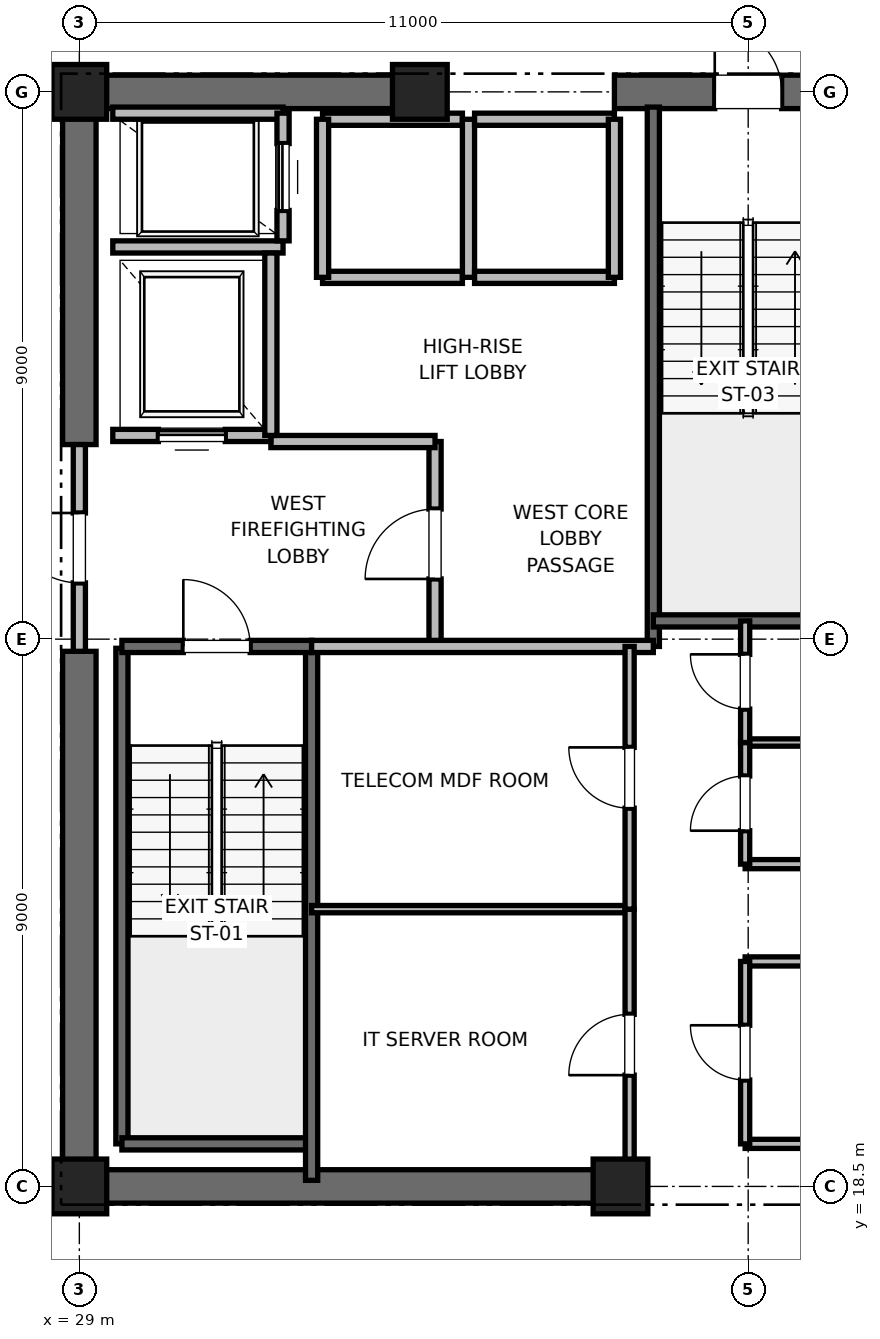
"""IFC4 building model, lengths in metres.
Left out: names, types, materials, properties, quantities, classifications, styles, units other than length and angle.
Written with IfcOpenShell. Run it as: python <this file> out.ifc"""

import sys

from ifc_helpers import new_model, si_unit, direction, frame, frame_2d, origin, origin_2d, place, context, subcontext, project, spatial, rectangle, extrude, element, fill, save


model = new_model("IFC4")
c1 = context("Model", 3, precision=1e-05, world=origin(), true_north=direction((0.0, 1.0)))
c2 = subcontext(c1, "Body", "Model", "MODEL_VIEW")
j1 = project(units=[si_unit("LENGTHUNIT", "METRE"), si_unit("PLANEANGLEUNIT", "RADIAN")], contexts=[c1])
p1 = place(None, origin())
s1 = spatial("IfcSite", under=j1, at=p1, CompositionType="ELEMENT")
p2 = place(p1, origin())
s2 = spatial("IfcBuilding", under=s1, at=p2, CompositionType="ELEMENT")
p3 = place(p2, frame((0.0, 0.0, 229.2)))
s3 = spatial("IfcBuildingStorey", under=s2, at=p3, CompositionType="ELEMENT", Elevation=229.2)
for number, where, z_axis, x_axis in (
    (1, (29.0, 18.5, 0.0), (0.0, 0.0, 1.0), (1.0, 0.0, 0.0)),
    (2, (29.0, 36.5, 0.0), (0.0, 0.0, 1.0), (1.0, 0.0, 0.0)),
    (3, (37.9, 18.5, 0.0), (0.0, 0.0, 1.0), (1.0, 0.0, 0.0)),
    (4, (34.6, 36.5, 0.0), (0.0, 0.0, 1.0), (1.0, 0.0, 0.0)),
):
    element("IfcColumn", number, at=place(p3, frame(where, z_axis=z_axis, x_axis=x_axis)), inside=s3, PredefinedType="PILASTER", context=c2, shape_type="SweptSolid", body=[
        extrude(rectangle(XDim=0.9, YDim=0.9, at=origin_2d()), origin(), (0.0, 0.0, 1.0), 4.0),
    ])
p4 = place(p3, frame((29.0, 18.5, 0.0), z_axis=(0.0, 0.0, 1.0), x_axis=(1.0, 0.0, 0.0)))
e5 = element("IfcWall", 5, at=p4, inside=s3, PredefinedType="SHEAR", context=c2, shape_type="SweptSolid", body=[
    extrude(rectangle(XDim=9.2, YDim=0.55, at=frame_2d((4.6, 0.0))), origin(), (0.0, 0.0, 1.0), 3.7),
])
p5 = place(p3, frame((29.0, 36.5, 0.0), z_axis=(0.0, 0.0, 1.0), x_axis=(1.0, 0.0, 0.0)))
e6 = element("IfcWall", 6, at=p5, inside=s3, PredefinedType="SHEAR", context=c2, shape_type="SweptSolid", body=[
    extrude(rectangle(XDim=5.8, YDim=0.55, at=frame_2d((2.9, 0.0))), origin(), (0.0, 0.0, 1.0), 3.7),
])
p6 = place(p3, frame((37.8, 36.5, 0.0), z_axis=(0.0, 0.0, 1.0), x_axis=(1.0, 0.0, 0.0)))
e7 = element("IfcWall", 7, at=p6, inside=s3, PredefinedType="SHEAR", context=c2, shape_type="SweptSolid", body=[
    extrude(rectangle(XDim=4.4, YDim=0.55, at=frame_2d((2.2, 0.0))), origin(), (0.0, 0.0, 1.0), 3.7),
])
p7 = place(p6, frame((1.65, 0.0, 0.0)))
e8 = element("IfcOpeningElement", 8, at=p7, cuts=e7, PredefinedType="OPENING", context=c2, shape_type="SweptSolid", body=[
    extrude(rectangle(XDim=1.1, YDim=2.15, at=frame_2d((0.55, 1.075))), frame((0.0, 0.275, 0.0), z_axis=(0.0, -1.0, 0.0), x_axis=(1.0, 0.0, 0.0)), (0.0, 0.0, 1.0), 0.55),
])
p8 = place(p3, frame((29.0, 18.5, 0.0), z_axis=(0.0, 0.0, 1.0), x_axis=(0.0, 1.0, 0.0)))
e9 = element("IfcWall", 9, at=p8, inside=s3, PredefinedType="SHEAR", context=c2, shape_type="SweptSolid", body=[
    extrude(rectangle(XDim=8.8, YDim=0.55, at=frame_2d((4.4, 0.0))), origin(), (0.0, 0.0, 1.0), 3.7),
])
p9 = place(p3, frame((29.0, 30.7, 0.0), z_axis=(0.0, 0.0, 1.0), x_axis=(0.0, 1.0, 0.0)))
e10 = element("IfcWall", 10, at=p9, inside=s3, PredefinedType="SHEAR", context=c2, shape_type="SweptSolid", body=[
    extrude(rectangle(XDim=5.8, YDim=0.55, at=frame_2d((2.9, 0.0))), origin(), (0.0, 0.0, 1.0), 3.7),
])
p10 = place(p3, frame((29.7, 19.2, 0.0), z_axis=(0.0, 0.0, 1.0), x_axis=(0.0, 1.0, 0.0)))
e11 = element("IfcWall", 11, at=p10, inside=s3, PredefinedType="SOLIDWALL", context=c2, shape_type="SweptSolid", body=[
    extrude(rectangle(XDim=8.15, YDim=0.2, at=frame_2d((4.075, 0.0))), origin(), (0.0, 0.0, 1.0), 3.7),
])
p11 = place(p3, frame((29.7, 19.2, 0.0), z_axis=(0.0, 0.0, 1.0), x_axis=(1.0, 0.0, 0.0)))
e12 = element("IfcWall", 12, at=p11, inside=s3, PredefinedType="SOLIDWALL", context=c2, shape_type="SweptSolid", body=[
    extrude(rectangle(XDim=3.12, YDim=0.2, at=frame_2d((1.56, 0.0))), origin(), (0.0, 0.0, 1.0), 3.7),
])
p12 = place(p3, frame((32.82, 18.6, 0.0), z_axis=(0.0, 0.0, 1.0), x_axis=(0.0, 1.0, 0.0)))
e13 = element("IfcWall", 13, at=p12, inside=s3, PredefinedType="SOLIDWALL", context=c2, shape_type="SweptSolid", body=[
    extrude(rectangle(XDim=8.78, YDim=0.2, at=frame_2d((4.39, 0.0))), origin(), (0.0, 0.0, 1.0), 3.7),
])
p13 = place(p3, frame((29.7, 27.38, 0.0), z_axis=(0.0, 0.0, 1.0), x_axis=(1.0, 0.0, 0.0)))
e14 = element("IfcWall", 14, at=p13, inside=s3, PredefinedType="SOLIDWALL", context=c2, shape_type="SweptSolid", body=[
    extrude(rectangle(XDim=3.12, YDim=0.2, at=frame_2d((1.56, 0.0))), origin(), (0.0, 0.0, 1.0), 3.7),
])
p14 = place(p13, frame((1.01, 0.0, 0.0)))
e15 = element("IfcOpeningElement", 15, at=p14, cuts=e14, PredefinedType="OPENING", context=c2, shape_type="SweptSolid", body=[
    extrude(rectangle(XDim=1.1, YDim=2.15, at=frame_2d((0.55, 1.075))), frame((0.0, 0.1, 0.0), z_axis=(0.0, -1.0, 0.0), x_axis=(1.0, 0.0, 0.0)), (0.0, 0.0, 1.0), 0.2),
])
p15 = place(p3, frame((38.44, 27.38, 0.0), z_axis=(0.0, 0.0, 1.0), x_axis=(0.0, 1.0, 0.0)))
e16 = element("IfcWall", 16, at=p15, inside=s3, PredefinedType="SOLIDWALL", context=c2, shape_type="SweptSolid", body=[
    extrude(rectangle(XDim=8.87, YDim=0.2, at=frame_2d((4.435, 0.0))), origin(), (0.0, 0.0, 1.0), 3.7),
])
p16 = place(p3, frame((38.44, 27.8, 0.0), z_axis=(0.0, 0.0, 1.0), x_axis=(1.0, 0.0, 0.0)))
e17 = element("IfcWall", 17, at=p16, inside=s3, PredefinedType="SOLIDWALL", context=c2, shape_type="SweptSolid", body=[
    extrude(rectangle(XDim=3.32, YDim=0.2, at=frame_2d((1.66, 0.0))), origin(), (0.0, 0.0, 1.0), 3.7),
])
p17 = place(p3, frame((34.85, 27.38, 0.0), z_axis=(0.0, 0.0, 1.0), x_axis=(0.0, 1.0, 0.0)))
e18 = element("IfcWall", 18, at=p17, inside=s3, PredefinedType="PARTITIONING", context=c2, shape_type="SweptSolid", body=[
    extrude(rectangle(XDim=3.37, YDim=0.2, at=frame_2d((1.685, 0.0))), origin(), (0.0, 0.0, 1.0), 3.7),
])
p18 = place(p17, frame((1.11, 0.0, 0.0)))
e19 = element("IfcOpeningElement", 19, at=p18, cuts=e18, PredefinedType="OPENING", context=c2, shape_type="SweptSolid", body=[
    extrude(rectangle(XDim=1.15, YDim=2.2, at=frame_2d((0.575, 1.1))), frame((0.0, 0.1, 0.0), z_axis=(0.0, -1.0, 0.0), x_axis=(1.0, 0.0, 0.0)), (0.0, 0.0, 1.0), 0.2),
])
p19 = place(p3, frame((29.0, 27.3, 0.0), z_axis=(0.0, 0.0, 1.0), x_axis=(0.0, 1.0, 0.0)))
e20 = element("IfcWall", 20, at=p19, inside=s3, PredefinedType="PARTITIONING", context=c2, shape_type="SweptSolid", body=[
    extrude(rectangle(XDim=3.4, YDim=0.2, at=frame_2d((1.7, 0.0))), origin(), (0.0, 0.0, 1.0), 2.68),
])
p20 = place(p19, frame((1.125, 0.0, 0.0)))
e21 = element("IfcOpeningElement", 21, at=p20, cuts=e20, PredefinedType="OPENING", context=c2, shape_type="SweptSolid", body=[
    extrude(rectangle(XDim=1.15, YDim=2.2, at=frame_2d((0.575, 1.1))), frame((0.0, 0.1, 0.0), z_axis=(0.0, -1.0, 0.0), x_axis=(1.0, 0.0, 0.0)), (0.0, 0.0, 1.0), 0.2),
])
p21 = place(p3, frame((32.82, 27.38, 0.0), z_axis=(0.0, 0.0, 1.0), x_axis=(1.0, 0.0, 0.0)))
e22 = element("IfcWall", 22, at=p21, inside=s3, PredefinedType="PARTITIONING", context=c2, shape_type="SweptSolid", body=[
    extrude(rectangle(XDim=5.62, YDim=0.2, at=frame_2d((2.81, 0.0))), origin(), (0.0, 0.0, 1.0), 3.7),
])
p22 = place(p3, frame((32.15, 30.75, 0.0), z_axis=(0.0, 0.0, 1.0), x_axis=(1.0, 0.0, 0.0)))
e23 = element("IfcWall", 23, at=p22, inside=s3, PredefinedType="PARTITIONING", context=c2, shape_type="SweptSolid", body=[
    extrude(rectangle(XDim=2.7, YDim=0.2, at=frame_2d((1.35, 0.0))), origin(), (0.0, 0.0, 1.0), 3.7),
])
p23 = place(p3, frame((29.55, 30.85, 0.0), z_axis=(0.0, 0.0, 1.0), x_axis=(1.0, 0.0, 0.0)))
e24 = element("IfcWall", 24, at=p23, inside=s3, PredefinedType="SOLIDWALL", context=c2, shape_type="SweptSolid", body=[
    extrude(rectangle(XDim=2.6, YDim=0.2, at=frame_2d((1.3, 0.0))), origin(), (0.0, 0.0, 1.0), 2.68),
])
p24 = place(p23, frame((0.75, 0.0, 0.0)))
e25 = element("IfcOpeningElement", 25, at=p24, cuts=e24, PredefinedType="OPENING", context=c2, shape_type="SweptSolid", body=[
    extrude(rectangle(XDim=1.1, YDim=2.2, at=frame_2d((0.55, 1.1))), frame((0.0, 0.1, 0.0), z_axis=(0.0, -1.0, 0.0), x_axis=(1.0, 0.0, 0.0)), (0.0, 0.0, 1.0), 0.2),
])
p25 = place(p3, frame((29.55, 33.95, 0.0), z_axis=(0.0, 0.0, 1.0), x_axis=(1.0, 0.0, 0.0)))
e26 = element("IfcWall", 26, at=p25, inside=s3, PredefinedType="SOLIDWALL", context=c2, shape_type="SweptSolid", body=[
    extrude(rectangle(XDim=2.8, YDim=0.2, at=frame_2d((1.4, 0.0))), origin(), (0.0, 0.0, 1.0), 3.7),
])
p26 = place(p3, frame((32.15, 30.85, 0.0), z_axis=(0.0, 0.0, 1.0), x_axis=(0.0, 1.0, 0.0)))
e27 = element("IfcWall", 27, at=p26, inside=s3, PredefinedType="SOLIDWALL", context=c2, shape_type="SweptSolid", body=[
    extrude(rectangle(XDim=3.0, YDim=0.2, at=frame_2d((1.5, 0.0))), origin(), (0.0, 0.0, 1.0), 3.7),
])
p27 = place(p3, frame((32.35, 36.15, 0.0), z_axis=(0.0, 0.0, 1.0), x_axis=(-1.0, 0.0, 0.0)))
e28 = element("IfcWall", 28, at=p27, inside=s3, PredefinedType="SOLIDWALL", context=c2, shape_type="SweptSolid", body=[
    extrude(rectangle(XDim=2.8, YDim=0.2, at=frame_2d((1.4, 0.0))), origin(), (0.0, 0.0, 1.0), 2.987),
])
p28 = place(p3, frame((32.35, 34.05, 0.0), z_axis=(0.0, 0.0, 1.0), x_axis=(0.0, 1.0, 0.0)))
e29 = element("IfcWall", 29, at=p28, inside=s3, PredefinedType="SOLIDWALL", context=c2, shape_type="SweptSolid", body=[
    extrude(rectangle(XDim=2.1, YDim=0.2, at=frame_2d((1.05, 0.0))), origin(), (0.0, 0.0, 1.0), 3.7),
])
p29 = place(p28, frame((0.5, 0.0, 0.0)))
e30 = element("IfcOpeningElement", 30, at=p29, cuts=e29, PredefinedType="OPENING", context=c2, shape_type="SweptSolid", body=[
    extrude(rectangle(XDim=1.1, YDim=2.2, at=frame_2d((0.55, 1.1))), frame((0.0, 0.1, 0.0), z_axis=(0.0, -1.0, 0.0), x_axis=(1.0, 0.0, 0.0)), (0.0, 0.0, 1.0), 0.2),
])
p30 = place(p3, frame((33.0, 33.45, 0.0), z_axis=(0.0, 0.0, 1.0), x_axis=(1.0, 0.0, 0.0)))
e31 = element("IfcWall", 31, at=p30, inside=s3, PredefinedType="SOLIDWALL", context=c2, shape_type="SweptSolid", body=[
    extrude(rectangle(XDim=2.3, YDim=0.2, at=frame_2d((1.15, 0.0))), origin(), (0.0, 0.0, 1.0), 3.7),
])
p31 = place(p3, frame((35.3, 36.05, 0.0), z_axis=(0.0, 0.0, 1.0), x_axis=(-1.0, 0.0, 0.0)))
e32 = element("IfcWall", 32, at=p31, inside=s3, PredefinedType="SOLIDWALL", context=c2, shape_type="SweptSolid", body=[
    extrude(rectangle(XDim=2.3, YDim=0.2, at=frame_2d((1.15, 0.0))), origin(), (0.0, 0.0, 1.0), 2.68),
])
p32 = place(p3, frame((33.0, 36.05, 0.0), z_axis=(0.0, 0.0, 1.0), x_axis=(0.0, -1.0, 0.0)))
e33 = element("IfcWall", 33, at=p32, inside=s3, PredefinedType="SOLIDWALL", context=c2, shape_type="SweptSolid", body=[
    extrude(rectangle(XDim=2.6, YDim=0.2, at=frame_2d((1.3, 0.0))), origin(), (0.0, 0.0, 1.0), 3.7),
])
p33 = place(p3, frame((35.4, 33.45, 0.0), z_axis=(0.0, 0.0, 1.0), x_axis=(0.0, 1.0, 0.0)))
e34 = element("IfcWall", 34, at=p33, inside=s3, PredefinedType="SOLIDWALL", context=c2, shape_type="SweptSolid", body=[
    extrude(rectangle(XDim=2.6, YDim=0.2, at=frame_2d((1.3, 0.0))), origin(), (0.0, 0.0, 1.0), 2.68),
])
p34 = place(p3, frame((35.5, 33.45, 0.0), z_axis=(0.0, 0.0, 1.0), x_axis=(1.0, 0.0, 0.0)))
e35 = element("IfcWall", 35, at=p34, inside=s3, PredefinedType="SOLIDWALL", context=c2, shape_type="SweptSolid", body=[
    extrude(rectangle(XDim=2.3, YDim=0.2, at=frame_2d((1.15, 0.0))), origin(), (0.0, 0.0, 1.0), 3.7),
])
p35 = place(p3, frame((37.8, 36.05, 0.0), z_axis=(0.0, 0.0, 1.0), x_axis=(-1.0, 0.0, 0.0)))
e36 = element("IfcWall", 36, at=p35, inside=s3, PredefinedType="SOLIDWALL", context=c2, shape_type="SweptSolid", body=[
    extrude(rectangle(XDim=2.3, YDim=0.2, at=frame_2d((1.15, 0.0))), origin(), (0.0, 0.0, 1.0), 2.68),
])
p36 = place(p3, frame((37.8, 33.45, 0.0), z_axis=(0.0, 0.0, 1.0), x_axis=(0.0, 1.0, 0.0)))
e37 = element("IfcWall", 37, at=p36, inside=s3, PredefinedType="SOLIDWALL", context=c2, shape_type="SweptSolid", body=[
    extrude(rectangle(XDim=2.6, YDim=0.2, at=frame_2d((1.3, 0.0))), origin(), (0.0, 0.0, 1.0), 2.68),
])
for number, where, z_axis, x_axis in (
    (38, (39.95, 19.2, 0.0), (0.0, 0.0, 1.0), (1.0, 0.0, 0.0)),
    (39, (39.95, 22.2, 0.0), (0.0, 0.0, 1.0), (1.0, 0.0, 0.0)),
    (40, (39.95, 23.8, 0.0), (0.0, 0.0, 1.0), (1.0, 0.0, 0.0)),
):
    element("IfcWall", number, at=place(p3, frame(where, z_axis=z_axis, x_axis=x_axis)), inside=s3, PredefinedType="PARTITIONING", context=c2, shape_type="SweptSolid", body=[
        extrude(rectangle(XDim=1.81, YDim=0.15, at=frame_2d((0.905, 0.0))), origin(), (0.0, 0.0, 1.0), 2.85),
    ])
p37 = place(p3, frame((39.95, 25.8, 0.0), z_axis=(0.0, 0.0, 1.0), x_axis=(1.0, 0.0, 0.0)))
e41 = element("IfcWall", 41, at=p37, inside=s3, PredefinedType="PARTITIONING", context=c2, shape_type="SweptSolid", body=[
    extrude(rectangle(XDim=1.81, YDim=0.12, at=frame_2d((0.905, 0.0))), origin(), (0.0, 0.0, 1.0), 2.85),
])
p38 = place(p3, frame((39.95, 19.2, 0.0), z_axis=(0.0, 0.0, 1.0), x_axis=(0.0, 1.0, 0.0)))
e42 = element("IfcWall", 42, at=p38, inside=s3, PredefinedType="PARTITIONING", context=c2, shape_type="SweptSolid", body=[
    extrude(rectangle(XDim=3.0, YDim=0.15, at=frame_2d((1.5, 0.0))), origin(), (0.0, 0.0, 1.0), 2.85),
])
p39 = place(p38, frame((1.05, 0.0, 0.0)))
e43 = element("IfcOpeningElement", 43, at=p39, cuts=e42, PredefinedType="OPENING", context=c2, shape_type="SweptSolid", body=[
    extrude(rectangle(XDim=0.9, YDim=2.1, at=frame_2d((0.45, 1.05))), frame((0.0, 0.075, 0.0), z_axis=(0.0, -1.0, 0.0), x_axis=(1.0, 0.0, 0.0)), (0.0, 0.0, 1.0), 0.15),
])
p40 = place(p3, frame((39.95, 23.8, 0.0), z_axis=(0.0, 0.0, 1.0), x_axis=(0.0, 1.0, 0.0)))
e44 = element("IfcWall", 44, at=p40, inside=s3, PredefinedType="PARTITIONING", context=c2, shape_type="SweptSolid", body=[
    extrude(rectangle(XDim=2.0, YDim=0.15, at=frame_2d((1.0, 0.0))), origin(), (0.0, 0.0, 1.0), 2.85),
])
p41 = place(p40, frame((0.55, 0.0, 0.0)))
e45 = element("IfcOpeningElement", 45, at=p41, cuts=e44, PredefinedType="OPENING", context=c2, shape_type="SweptSolid", body=[
    extrude(rectangle(XDim=0.9, YDim=2.1, at=frame_2d((0.45, 1.05))), frame((0.0, 0.075, 0.0), z_axis=(0.0, -1.0, 0.0), x_axis=(1.0, 0.0, 0.0)), (0.0, 0.0, 1.0), 0.15),
])
p42 = place(p3, frame((39.95, 25.8, 0.0), z_axis=(0.0, 0.0, 1.0), x_axis=(0.0, 1.0, 0.0)))
e46 = element("IfcWall", 46, at=p42, inside=s3, PredefinedType="PARTITIONING", context=c2, shape_type="SweptSolid", body=[
    extrude(rectangle(XDim=2.0, YDim=0.15, at=frame_2d((1.0, 0.0))), origin(), (0.0, 0.0, 1.0), 2.85),
])
p43 = place(p42, frame((0.55, 0.0, 0.0)))
e47 = element("IfcOpeningElement", 47, at=p43, cuts=e46, PredefinedType="OPENING", context=c2, shape_type="SweptSolid", body=[
    extrude(rectangle(XDim=0.9, YDim=2.1, at=frame_2d((0.45, 1.05))), frame((0.0, 0.075, 0.0), z_axis=(0.0, -1.0, 0.0), x_axis=(1.0, 0.0, 0.0)), (0.0, 0.0, 1.0), 0.15),
])
p44 = place(p3, frame((32.82, 23.06, 0.0), z_axis=(0.0, 0.0, 1.0), x_axis=(1.0, 0.0, 0.0)))
e48 = element("IfcWall", 48, at=p44, inside=s3, PredefinedType="PARTITIONING", context=c2, shape_type="SweptSolid", body=[
    extrude(rectangle(XDim=5.23, YDim=0.12, at=frame_2d((2.615, 0.0))), origin(), (0.0, 0.0, 1.0), 2.85),
])
p45 = place(p3, frame((38.05, 18.6, 0.0), z_axis=(0.0, 0.0, 1.0), x_axis=(0.0, 1.0, 0.0)))
e49 = element("IfcWall", 49, at=p45, inside=s3, PredefinedType="PARTITIONING", context=c2, shape_type="SweptSolid", body=[
    extrude(rectangle(XDim=4.46, YDim=0.15, at=frame_2d((2.23, 0.0))), origin(), (0.0, 0.0, 1.0), 2.68),
])
p46 = place(p45, frame((1.73, 0.0, 0.0)))
e50 = element("IfcOpeningElement", 50, at=p46, cuts=e49, PredefinedType="OPENING", context=c2, shape_type="SweptSolid", body=[
    extrude(rectangle(XDim=1.0, YDim=2.15, at=frame_2d((0.5, 1.075))), frame((0.0, 0.075, 0.0), z_axis=(0.0, -1.0, 0.0), x_axis=(1.0, 0.0, 0.0)), (0.0, 0.0, 1.0), 0.15),
])
p47 = place(p3, frame((38.05, 23.06, 0.0), z_axis=(0.0, 0.0, 1.0), x_axis=(0.0, 1.0, 0.0)))
e51 = element("IfcWall", 51, at=p47, inside=s3, PredefinedType="PARTITIONING", context=c2, shape_type="SweptSolid", body=[
    extrude(rectangle(XDim=4.32, YDim=0.15, at=frame_2d((2.16, 0.0))), origin(), (0.0, 0.0, 1.0), 2.85),
])
p48 = place(p47, frame((1.66, 0.0, 0.0)))
e52 = element("IfcOpeningElement", 52, at=p48, cuts=e51, PredefinedType="OPENING", context=c2, shape_type="SweptSolid", body=[
    extrude(rectangle(XDim=1.0, YDim=2.15, at=frame_2d((0.5, 1.075))), frame((0.0, 0.075, 0.0), z_axis=(0.0, -1.0, 0.0), x_axis=(1.0, 0.0, 0.0)), (0.0, 0.0, 1.0), 0.15),
])
p49 = place(p14, origin())
e53 = element("IfcDoor", 53, at=p49, inside=s3, OperationType="SINGLE_SWING_LEFT", PredefinedType="DOOR", context=c2, shape_type="SweptSolid", body=[
    extrude(rectangle(XDim=1.1, YDim=2.15, at=frame_2d((0.55, 1.075))), frame((0.0, 0.025, 0.0), z_axis=(0.0, -1.0, 0.0), x_axis=(1.0, 0.0, 0.0)), (0.0, 0.0, 1.0), 0.05),
])
fill(e15, e53)
p50 = place(p7, origin())
e54 = element("IfcDoor", 54, at=p50, inside=s3, OperationType="SINGLE_SWING_LEFT", PredefinedType="DOOR", context=c2, shape_type="SweptSolid", body=[
    extrude(rectangle(XDim=1.1, YDim=2.15, at=frame_2d((0.55, 1.075))), frame((0.0, 0.025, 0.0), z_axis=(0.0, -1.0, 0.0), x_axis=(1.0, 0.0, 0.0)), (0.0, 0.0, 1.0), 0.05),
])
fill(e8, e54)
p51 = place(p18, origin())
e55 = element("IfcDoor", 55, at=p51, inside=s3, OperationType="SINGLE_SWING_LEFT", PredefinedType="DOOR", context=c2, shape_type="SweptSolid", body=[
    extrude(rectangle(XDim=1.15, YDim=2.2, at=frame_2d((0.575, 1.1))), frame((0.0, 0.025, 0.0), z_axis=(0.0, -1.0, 0.0), x_axis=(1.0, 0.0, 0.0)), (0.0, 0.0, 1.0), 0.05),
])
fill(e19, e55)
p52 = place(p20, origin())
e56 = element("IfcDoor", 56, at=p52, inside=s3, OperationType="SINGLE_SWING_RIGHT", PredefinedType="DOOR", context=c2, shape_type="SweptSolid", body=[
    extrude(rectangle(XDim=1.15, YDim=2.2, at=frame_2d((0.575, 1.1))), frame((0.0, 0.025, 0.0), z_axis=(0.0, -1.0, 0.0), x_axis=(1.0, 0.0, 0.0)), (0.0, 0.0, 1.0), 0.05),
])
fill(e21, e56)
p53 = place(p24, origin())
e57 = element("IfcDoor", 57, at=p53, inside=s3, OperationType="SLIDING_TO_RIGHT", PredefinedType="DOOR", context=c2, shape_type="SweptSolid", body=[
    extrude(rectangle(XDim=1.1, YDim=2.2, at=frame_2d((0.55, 1.1))), frame((0.0, 0.025, 0.0), z_axis=(0.0, -1.0, 0.0), x_axis=(1.0, 0.0, 0.0)), (0.0, 0.0, 1.0), 0.05),
])
fill(e25, e57)
p54 = place(p29, origin())
e58 = element("IfcDoor", 58, at=p54, inside=s3, OperationType="SLIDING_TO_RIGHT", PredefinedType="DOOR", context=c2, shape_type="SweptSolid", body=[
    extrude(rectangle(XDim=1.1, YDim=2.2, at=frame_2d((0.55, 1.1))), frame((0.0, 0.025, 0.0), z_axis=(0.0, -1.0, 0.0), x_axis=(1.0, 0.0, 0.0)), (0.0, 0.0, 1.0), 0.05),
])
fill(e30, e58)
p55 = place(p39, origin())
e59 = element("IfcDoor", 59, at=p55, inside=s3, OperationType="SINGLE_SWING_RIGHT", PredefinedType="DOOR", context=c2, shape_type="SweptSolid", body=[
    extrude(rectangle(XDim=0.9, YDim=2.1, at=frame_2d((0.45, 1.05))), frame((0.0, 0.025, 0.0), z_axis=(0.0, -1.0, 0.0), x_axis=(1.0, 0.0, 0.0)), (0.0, 0.0, 1.0), 0.05),
])
fill(e43, e59)
p56 = place(p41, origin())
e60 = element("IfcDoor", 60, at=p56, inside=s3, OperationType="SINGLE_SWING_LEFT", PredefinedType="DOOR", context=c2, shape_type="SweptSolid", body=[
    extrude(rectangle(XDim=0.9, YDim=2.1, at=frame_2d((0.45, 1.05))), frame((0.0, 0.025, 0.0), z_axis=(0.0, -1.0, 0.0), x_axis=(1.0, 0.0, 0.0)), (0.0, 0.0, 1.0), 0.05),
])
fill(e45, e60)
p57 = place(p43, origin())
e61 = element("IfcDoor", 61, at=p57, inside=s3, OperationType="SINGLE_SWING_RIGHT", PredefinedType="DOOR", context=c2, shape_type="SweptSolid", body=[
    extrude(rectangle(XDim=0.9, YDim=2.1, at=frame_2d((0.45, 1.05))), frame((0.0, 0.025, 0.0), z_axis=(0.0, -1.0, 0.0), x_axis=(1.0, 0.0, 0.0)), (0.0, 0.0, 1.0), 0.05),
])
fill(e47, e61)
p58 = place(p46, origin())
e62 = element("IfcDoor", 62, at=p58, inside=s3, OperationType="SINGLE_SWING_LEFT", PredefinedType="DOOR", context=c2, shape_type="SweptSolid", body=[
    extrude(rectangle(XDim=1.0, YDim=2.15, at=frame_2d((0.5, 1.075))), frame((0.0, 0.025, 0.0), z_axis=(0.0, -1.0, 0.0), x_axis=(1.0, 0.0, 0.0)), (0.0, 0.0, 1.0), 0.05),
])
fill(e50, e62)
p59 = place(p48, origin())
e63 = element("IfcDoor", 63, at=p59, inside=s3, OperationType="SINGLE_SWING_RIGHT", PredefinedType="DOOR", context=c2, shape_type="SweptSolid", body=[
    extrude(rectangle(XDim=1.0, YDim=2.15, at=frame_2d((0.5, 1.075))), frame((0.0, 0.025, 0.0), z_axis=(0.0, -1.0, 0.0), x_axis=(1.0, 0.0, 0.0)), (0.0, 0.0, 1.0), 0.05),
])
fill(e52, e63)
save(model, sys.argv[1])
